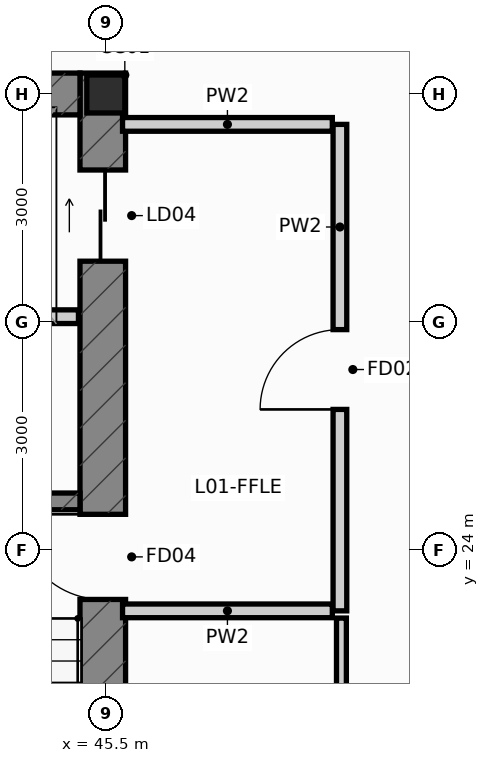
"""IFC4 building model, lengths in metres.
Left out: names, types, materials, properties, quantities, classifications, styles, units other than length and angle.
Written with IfcOpenShell. Run it as: python <this file> out.ifc"""

import sys

from ifc_helpers import new_model, si_unit, direction, frame, frame_2d, origin, origin_2d, place, context, subcontext, project, spatial, rectangle, i_section, extrude, source, transform, mapped, element, fill, save


model = new_model("IFC4")
c1 = context("Model", 3, precision=1e-05, world=origin(), true_north=direction((0.0, 1.0)))
c2 = subcontext(c1, "Body", "Model", "MODEL_VIEW")
j1 = project(units=[si_unit("LENGTHUNIT", "METRE"), si_unit("PLANEANGLEUNIT", "RADIAN")], contexts=[c1])
p1 = place(None, origin())
s1 = spatial("IfcSite", under=j1, at=p1, CompositionType="ELEMENT")
p2 = place(p1, origin())
s2 = spatial("IfcBuilding", under=s1, at=p2, CompositionType="ELEMENT")
p3 = place(p2, frame((0.0, 0.0, 5.4)))
s3 = spatial("IfcBuildingStorey", under=s2, at=p3, CompositionType="ELEMENT", Elevation=5.4)
m1 = source(origin(), c2, "Body", "SweptSolid", [
    extrude(i_section(OverallWidth=0.5, OverallDepth=0.5, WebThickness=0.028, FlangeThickness=0.04, at=origin_2d()), origin(), (0.0, 0.0, 1.0), 4.8),
])
p4 = place(p3, frame((45.5, 30.0, 0.0), z_axis=(0.0, 0.0, 1.0), x_axis=(1.0, 0.0, 0.0)))
e1 = element("IfcColumn", 1, at=p4, inside=s3, PredefinedType="COLUMN", context=c2, shape_type="MappedRepresentation", body=[
    mapped(m1, transform((0.0, 0.0, 0.0), scale=1.0)),
])
p5 = place(p3, frame((45.46, 16.85, 0.0), z_axis=(0.0, 0.0, 1.0), x_axis=(0.0, 1.0, 0.0)))
e2 = element("IfcWall", 2, at=p5, inside=s3, PredefinedType="SHEAR", context=c2, shape_type="SweptSolid", body=[
    extrude(rectangle(XDim=13.425, YDim=0.6, at=frame_2d((6.712, 0.0))), origin(), (0.0, 0.0, 1.0), 4.8),
])
p6 = place(p5, frame((6.5, 0.0, 0.0)))
e3 = element("IfcOpeningElement", 3, at=p6, cuts=e2, PredefinedType="OPENING", context=c2, shape_type="SweptSolid", body=[
    extrude(rectangle(XDim=1.12, YDim=2.15, at=frame_2d((0.56, 1.075))), frame((0.0, 0.312, 0.0), z_axis=(0.0, -1.0, 0.0), x_axis=(1.0, 0.0, 0.0)), (0.0, 0.0, 1.0), 0.624),
])
p7 = place(p5, frame((10.95, 0.0, 0.0)))
e4 = element("IfcOpeningElement", 4, at=p7, cuts=e2, PredefinedType="OPENING", context=c2, shape_type="SweptSolid", body=[
    extrude(rectangle(XDim=1.2, YDim=2.2, at=frame_2d((0.6, 1.1))), frame((0.0, 0.312, 0.0), z_axis=(0.0, -1.0, 0.0), x_axis=(1.0, 0.0, 0.0)), (0.0, 0.0, 1.0), 0.624),
])
p8 = place(p3, frame((42.26, 30.0, 0.0), z_axis=(0.0, 0.0, 1.0), x_axis=(1.0, 0.0, 0.0)))
e5 = element("IfcWall", 5, at=p8, inside=s3, PredefinedType="SHEAR", context=c2, shape_type="SweptSolid", body=[
    extrude(rectangle(XDim=2.9, YDim=0.55, at=frame_2d((1.45, 0.0))), origin(), (0.0, 0.0, 1.0), 4.8),
])
p9 = place(p3, frame((42.26, 24.64, 0.0), z_axis=(0.0, 0.0, 1.0), x_axis=(1.0, 0.0, 0.0)))
e6 = element("IfcWall", 6, at=p9, inside=s3, PredefinedType="SHEAR", context=c2, shape_type="SweptSolid", body=[
    extrude(rectangle(XDim=2.9, YDim=0.22, at=frame_2d((1.45, 0.0))), origin(), (0.0, 0.0, 1.0), 4.8),
])
p10 = place(p3, frame((48.58, 23.2, 0.0), z_axis=(0.0, 0.0, 1.0), x_axis=(0.0, 1.0, 0.0)))
e7 = element("IfcWall", 7, at=p10, inside=s3, PredefinedType="PARTITIONING", context=c2, shape_type="SweptSolid", body=[
    extrude(rectangle(XDim=6.4, YDim=0.18, at=frame_2d((3.2, 0.0))), origin(), (0.0, 0.0, 1.0), 4.48),
])
p11 = place(p10, frame((2.65, 0.0, 0.0)))
e8 = element("IfcOpeningElement", 8, at=p11, cuts=e7, PredefinedType="OPENING", context=c2, shape_type="SweptSolid", body=[
    extrude(rectangle(XDim=1.05, YDim=2.15, at=frame_2d((0.525, 1.075))), frame((0.0, 0.102, 0.0), z_axis=(0.0, -1.0, 0.0), x_axis=(1.0, 0.0, 0.0)), (0.0, 0.0, 1.0), 0.204),
])
p12 = place(p3, frame((45.72, 23.2, 0.0), z_axis=(0.0, 0.0, 1.0), x_axis=(1.0, 0.0, 0.0)))
e9 = element("IfcWall", 9, at=p12, inside=s3, PredefinedType="PARTITIONING", context=c2, shape_type="SweptSolid", body=[
    extrude(rectangle(XDim=2.76, YDim=0.18, at=frame_2d((1.38, 0.0))), origin(), (0.0, 0.0, 1.0), 4.48),
])
p13 = place(p3, frame((45.72, 29.6, 0.0), z_axis=(0.0, 0.0, 1.0), x_axis=(1.0, 0.0, 0.0)))
e10 = element("IfcWall", 10, at=p13, inside=s3, PredefinedType="PARTITIONING", context=c2, shape_type="SweptSolid", body=[
    extrude(rectangle(XDim=2.76, YDim=0.18, at=frame_2d((1.38, 0.0))), origin(), (0.0, 0.0, 1.0), 3.854),
])
p14 = place(p3, frame((42.24, 27.07, 0.0), z_axis=(0.0, 0.0, 1.0), x_axis=(1.0, 0.0, 0.0)))
e11 = element("IfcWall", 11, at=p14, inside=s3, PredefinedType="PARTITIONING", context=c2, shape_type="SweptSolid", body=[
    extrude(rectangle(XDim=2.9, YDim=0.18, at=frame_2d((1.45, 0.0))), origin(), (0.0, 0.0, 1.0), 4.48),
])
p15 = place(p3, frame((48.6, 14.355, 0.0), z_axis=(0.0, 0.0, 1.0), x_axis=(0.0, 1.0, 0.0)))
e12 = element("IfcWall", 12, at=p15, inside=s3, PredefinedType="PARTITIONING", context=c2, shape_type="SweptSolid", body=[
    extrude(rectangle(XDim=8.75, YDim=0.13, at=frame_2d((4.375, 0.0))), origin(), (0.0, 0.0, 1.0), 4.48),
])
p16 = place(p6, origin())
e13 = element("IfcDoor", 13, at=p16, inside=s3, OperationType="SINGLE_SWING_RIGHT", PredefinedType="DOOR", context=c2, shape_type="SweptSolid", body=[
    extrude(rectangle(XDim=1.12, YDim=2.15, at=frame_2d((0.56, 1.075))), frame((0.0, 0.025, 0.0), z_axis=(0.0, -1.0, 0.0), x_axis=(1.0, 0.0, 0.0)), (0.0, 0.0, 1.0), 0.05),
])
fill(e3, e13)
p17 = place(p7, origin())
e14 = element("IfcDoor", 14, at=p17, inside=s3, OperationType="SLIDING_TO_RIGHT", PredefinedType="DOOR", context=c2, shape_type="SweptSolid", body=[
    extrude(rectangle(XDim=1.2, YDim=2.2, at=frame_2d((0.6, 1.1))), frame((0.0, 0.025, 0.0), z_axis=(0.0, -1.0, 0.0), x_axis=(1.0, 0.0, 0.0)), (0.0, 0.0, 1.0), 0.05),
])
fill(e4, e14)
p18 = place(p11, origin())
e15 = element("IfcDoor", 15, at=p18, inside=s3, OperationType="SINGLE_SWING_LEFT", PredefinedType="DOOR", context=c2, shape_type="SweptSolid", body=[
    extrude(rectangle(XDim=1.05, YDim=2.15, at=frame_2d((0.525, 1.075))), frame((0.0, 0.025, 0.0), z_axis=(0.0, -1.0, 0.0), x_axis=(1.0, 0.0, 0.0)), (0.0, 0.0, 1.0), 0.05),
])
fill(e8, e15)
save(model, sys.argv[1])
